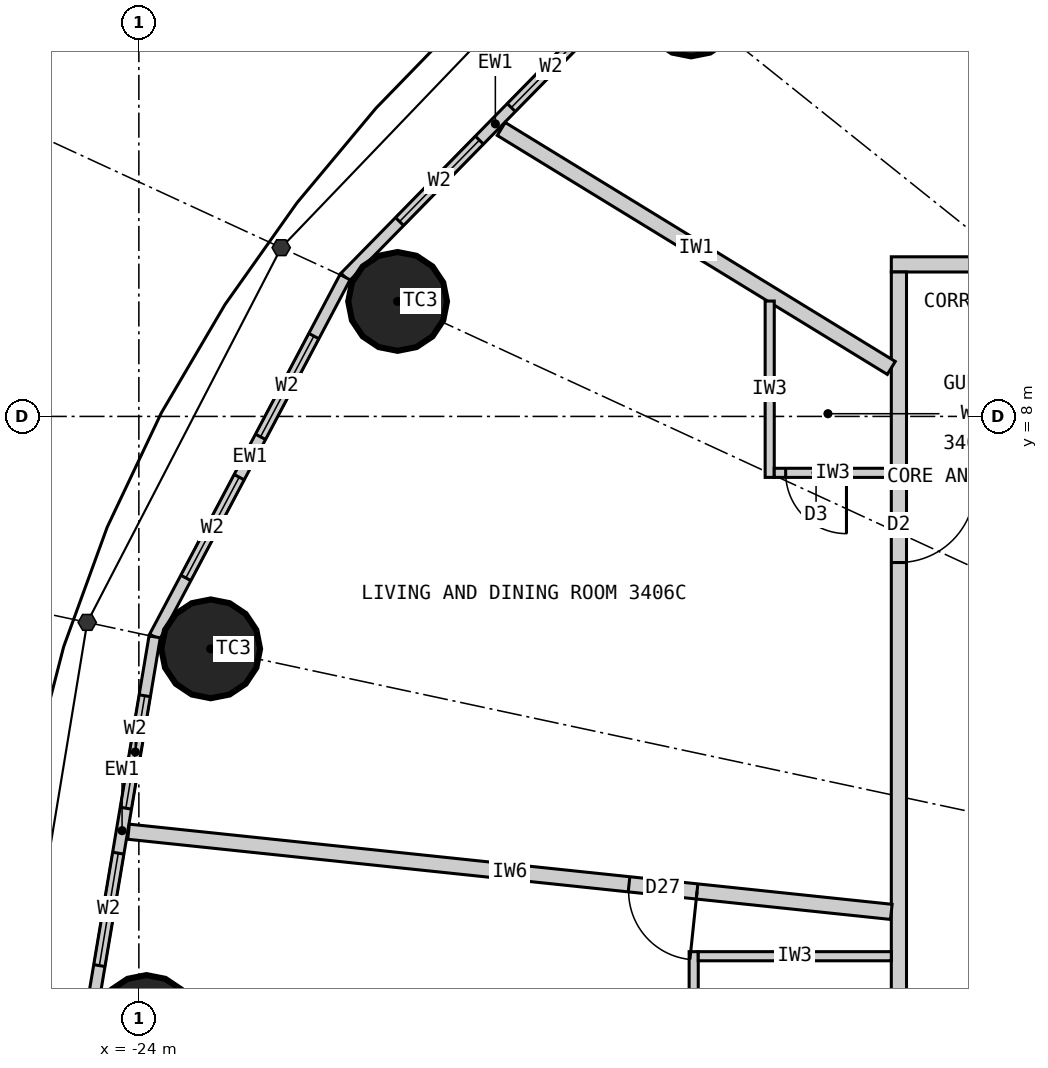
"""IFC4 building model, lengths in metres.
Left out: names, types, materials, properties, quantities, classifications, styles, units other than length and angle.
Written with IfcOpenShell. Run it as: python <this file> out.ifc"""

import sys

from ifc_helpers import new_model, si_unit, direction, frame, frame_2d, origin, origin_2d, place, context, subcontext, project, spatial, rectangle, circle, extrude, element, fill, save


model = new_model("IFC4")
c1 = context("Model", 3, precision=1e-05, world=origin(), true_north=direction((0.0, 1.0)))
c2 = subcontext(c1, "Body", "Model", "MODEL_VIEW")
j1 = project(units=[si_unit("LENGTHUNIT", "METRE"), si_unit("PLANEANGLEUNIT", "RADIAN")], contexts=[c1])
p1 = place(None, origin())
s1 = spatial("IfcSite", under=j1, at=p1, CompositionType="ELEMENT")
p2 = place(p1, origin())
s2 = spatial("IfcBuilding", under=s1, at=p2, CompositionType="ELEMENT")
p3 = place(p2, frame((0.0, 0.0, 132.0)))
s3 = spatial("IfcBuildingStorey", under=s2, at=p3, CompositionType="ELEMENT", Elevation=132.0)
for number, where, z_axis, x_axis in (
    (1, (-16.734, 13.387, 0.0), (0.0, 0.0, 1.0), (1.0, 0.0, 0.0)),
    (2, (-20.596, 9.513, 0.0), (0.0, 0.0, 1.0), (1.0, 0.0, 0.0)),
    (3, (-23.055, 4.942, 0.0), (0.0, 0.0, 1.0), (1.0, 0.0, 0.0)),
    (4, (-23.9, 0.0, 0.0), (0.0, 0.0, 1.0), (1.0, 0.0, 0.0)),
):
    element("IfcColumn", number, at=place(p3, frame(where, z_axis=z_axis, x_axis=x_axis)), inside=s3, PredefinedType="COLUMN", context=c2, shape_type="SweptSolid", body=[
        extrude(circle(Radius=0.65, at=origin_2d()), origin(), (0.0, 0.0, 1.0), 3.3),
    ])
p4 = place(p3, frame((-17.332, 13.866, 0.0), z_axis=(0.0, 0.0, 1.0), x_axis=(-0.700136650834, -0.714008872605, 0.0)))
e5 = element("IfcWall", 5, at=p4, inside=s3, PredefinedType="ELEMENTEDWALL", context=c2, shape_type="SweptSolid", body=[
    extrude(rectangle(XDim=5.649, YDim=0.15, at=frame_2d((2.825, 0.0))), origin(), (0.0, 0.0, 1.0), 3.12),
])
p5 = place(p4, frame((1.025, 0.0, 0.9)))
e6 = element("IfcOpeningElement", 6, at=p5, cuts=e5, PredefinedType="OPENING", context=c2, shape_type="SweptSolid", body=[
    extrude(rectangle(XDim=1.5, YDim=1.9, at=frame_2d((0.75, 0.95))), frame((0.0, 0.085, 0.0), z_axis=(0.0, -1.0, 0.0), x_axis=(1.0, 0.0, 0.0)), (0.0, 0.0, 1.0), 0.17),
])
p6 = place(p4, frame((3.125, 0.0, 0.9)))
e7 = element("IfcOpeningElement", 7, at=p6, cuts=e5, PredefinedType="OPENING", context=c2, shape_type="SweptSolid", body=[
    extrude(rectangle(XDim=1.5, YDim=1.9, at=frame_2d((0.75, 0.95))), frame((0.0, 0.085, 0.0), z_axis=(0.0, -1.0, 0.0), x_axis=(1.0, 0.0, 0.0)), (0.0, 0.0, 1.0), 0.17),
])
p7 = place(p3, frame((-21.287, 9.832, 0.0), z_axis=(0.0, 0.0, 1.0), x_axis=(-0.467814388454, -0.883826735257, 0.0)))
e8 = element("IfcWall", 8, at=p7, inside=s3, PredefinedType="ELEMENTEDWALL", context=c2, shape_type="SweptSolid", body=[
    extrude(rectangle(XDim=5.354, YDim=0.15, at=frame_2d((2.677, 0.0))), origin(), (0.0, 0.0, 1.0), 3.12),
])
p8 = place(p7, frame((0.877, 0.0, 0.9)))
e9 = element("IfcOpeningElement", 9, at=p8, cuts=e8, PredefinedType="OPENING", context=c2, shape_type="SweptSolid", body=[
    extrude(rectangle(XDim=1.5, YDim=1.9, at=frame_2d((0.75, 0.95))), frame((0.0, 0.085, 0.0), z_axis=(0.0, -1.0, 0.0), x_axis=(1.0, 0.0, 0.0)), (0.0, 0.0, 1.0), 0.17),
])
p9 = place(p7, frame((2.977, 0.0, 0.9)))
e10 = element("IfcOpeningElement", 10, at=p9, cuts=e8, PredefinedType="OPENING", context=c2, shape_type="SweptSolid", body=[
    extrude(rectangle(XDim=1.5, YDim=1.9, at=frame_2d((0.75, 0.95))), frame((0.0, 0.085, 0.0), z_axis=(0.0, -1.0, 0.0), x_axis=(1.0, 0.0, 0.0)), (0.0, 0.0, 1.0), 0.17),
])
p10 = place(p3, frame((-23.792, 5.1, 0.0), z_axis=(0.0, 0.0, 1.0), x_axis=(-0.165883894218, -0.986145290329, 0.0)))
e11 = element("IfcWall", 11, at=p10, inside=s3, PredefinedType="ELEMENTEDWALL", context=c2, shape_type="SweptSolid", body=[
    extrude(rectangle(XDim=5.172, YDim=0.15, at=frame_2d((2.586, 0.0))), origin(), (0.0, 0.0, 1.0), 3.12),
])
p11 = place(p10, frame((0.786, 0.0, 0.9)))
e12 = element("IfcOpeningElement", 12, at=p11, cuts=e11, PredefinedType="OPENING", context=c2, shape_type="SweptSolid", body=[
    extrude(rectangle(XDim=1.5, YDim=1.9, at=frame_2d((0.75, 0.95))), frame((0.0, 0.085, 0.0), z_axis=(0.0, -1.0, 0.0), x_axis=(1.0, 0.0, 0.0)), (0.0, 0.0, 1.0), 0.17),
])
p12 = place(p10, frame((2.886, 0.0, 0.9)))
e13 = element("IfcOpeningElement", 13, at=p12, cuts=e11, PredefinedType="OPENING", context=c2, shape_type="SweptSolid", body=[
    extrude(rectangle(XDim=1.5, YDim=1.9, at=frame_2d((0.75, 0.95))), frame((0.0, 0.085, 0.0), z_axis=(0.0, -1.0, 0.0), x_axis=(1.0, 0.0, 0.0)), (0.0, 0.0, 1.0), 0.17),
])
p13 = place(p3, frame((-14.1, 10.0, 0.0), z_axis=(0.0, 0.0, 1.0), x_axis=(1.0, 0.0, 0.0)))
e14 = element("IfcWall", 14, at=p13, inside=s3, PredefinedType="PARTITIONING", context=c2, shape_type="SweptSolid", body=[
    extrude(rectangle(XDim=12.535, YDim=0.2, at=frame_2d((6.268, 0.0))), origin(), (0.0, 0.0, 1.0), 3.12),
])
p14 = place(p13, frame((2.801, 0.0, 0.0)))
e15 = element("IfcOpeningElement", 15, at=p14, cuts=e14, PredefinedType="OPENING", context=c2, shape_type="SweptSolid", body=[
    extrude(rectangle(XDim=1.0, YDim=2.2, at=frame_2d((0.5, 1.1))), frame((0.0, 0.11, 0.0), z_axis=(0.0, -1.0, 0.0), x_axis=(1.0, 0.0, 0.0)), (0.0, 0.0, 1.0), 0.22),
])
p15 = place(p3, frame((-14.0, 9.9, 0.0), z_axis=(0.0, 0.0, 1.0), x_axis=(0.0, -1.0, 0.0)))
e16 = element("IfcWall", 16, at=p15, inside=s3, PredefinedType="PARTITIONING", context=c2, shape_type="SweptSolid", body=[
    extrude(rectangle(XDim=19.8, YDim=0.2, at=frame_2d((9.9, 0.0))), origin(), (0.0, 0.0, 1.0), 3.12),
])
p16 = place(p15, frame((2.822, 0.0, 0.0)))
e17 = element("IfcOpeningElement", 17, at=p16, cuts=e16, PredefinedType="OPENING", context=c2, shape_type="SweptSolid", body=[
    extrude(rectangle(XDim=1.0, YDim=2.2, at=frame_2d((0.5, 1.1))), frame((0.0, 0.11, 0.0), z_axis=(0.0, -1.0, 0.0), x_axis=(1.0, 0.0, 0.0)), (0.0, 0.0, 1.0), 0.22),
])
p17 = place(p15, frame((13.742, 0.0, 0.0)))
e18 = element("IfcOpeningElement", 18, at=p17, cuts=e16, PredefinedType="OPENING", context=c2, shape_type="SweptSolid", body=[
    extrude(rectangle(XDim=1.0, YDim=2.2, at=frame_2d((0.5, 1.1))), frame((0.0, 0.11, 0.0), z_axis=(0.0, -1.0, 0.0), x_axis=(1.0, 0.0, 0.0)), (0.0, 0.0, 1.0), 0.22),
])
p18 = place(p15, frame((18.698, 0.0, 0.0)))
e19 = element("IfcOpeningElement", 19, at=p18, cuts=e16, PredefinedType="OPENING", context=c2, shape_type="SweptSolid", body=[
    extrude(rectangle(XDim=1.0, YDim=2.2, at=frame_2d((0.5, 1.1))), frame((0.0, 0.11, 0.0), z_axis=(0.0, -1.0, 0.0), x_axis=(1.0, 0.0, 0.0)), (0.0, 0.0, 1.0), 0.22),
])
p19 = place(p3, frame((-14.1, 8.638, 0.0), z_axis=(0.0, 0.0, 1.0), x_axis=(-0.852706758009, 0.5223898782, 0.0)))
e20 = element("IfcWall", 20, at=p19, inside=s3, PredefinedType="PARTITIONING", context=c2, shape_type="SweptSolid", body=[
    extrude(rectangle(XDim=6.019, YDim=0.2, at=frame_2d((3.009, 0.0))), origin(), (0.0, 0.0, 1.0), 3.12),
])
p20 = place(p3, frame((-14.1, 1.482, 0.0), z_axis=(0.0, 0.0, 1.0), x_axis=(-0.994523202615, 0.104516024894, 0.0)))
e21 = element("IfcWall", 21, at=p20, inside=s3, PredefinedType="PARTITIONING", context=c2, shape_type="SweptSolid", body=[
    extrude(rectangle(XDim=10.091, YDim=0.2, at=frame_2d((5.045, 0.0))), origin(), (0.0, 0.0, 1.0), 2.37),
])
p21 = place(p20, frame((2.57, 0.0, 0.0)))
e22 = element("IfcOpeningElement", 22, at=p21, cuts=e21, PredefinedType="OPENING", context=c2, shape_type="SweptSolid", body=[
    extrude(rectangle(XDim=0.9, YDim=2.1, at=frame_2d((0.45, 1.05))), frame((0.0, 0.11, 0.0), z_axis=(0.0, -1.0, 0.0), x_axis=(1.0, 0.0, 0.0)), (0.0, 0.0, 1.0), 0.22),
])
p22 = place(p3, frame((-15.7, 9.518, 0.0), z_axis=(0.0, 0.0, 1.0), x_axis=(0.0, -1.0, 0.0)))
e23 = element("IfcWall", 23, at=p22, inside=s3, PredefinedType="PARTITIONING", context=c2, shape_type="SweptSolid", body=[
    extrude(rectangle(XDim=2.32, YDim=0.12, at=frame_2d((1.16, 0.0))), origin(), (0.0, 0.0, 1.0), 3.12),
])
p23 = place(p3, frame((-14.1, 7.258, 0.0), z_axis=(0.0, 0.0, 1.0), x_axis=(-1.0, 0.0, 0.0)))
e24 = element("IfcWall", 24, at=p23, inside=s3, PredefinedType="PARTITIONING", context=c2, shape_type="SweptSolid", body=[
    extrude(rectangle(XDim=1.54, YDim=0.12, at=frame_2d((0.77, 0.0))), origin(), (0.0, 0.0, 1.0), 3.12),
])
p24 = place(p23, frame((0.59, 0.0, 0.0)))
e25 = element("IfcOpeningElement", 25, at=p24, cuts=e24, PredefinedType="OPENING", context=c2, shape_type="SweptSolid", body=[
    extrude(rectangle(XDim=0.8, YDim=2.1, at=frame_2d((0.4, 1.05))), frame((0.0, 0.07, 0.0), z_axis=(0.0, -1.0, 0.0), x_axis=(1.0, 0.0, 0.0)), (0.0, 0.0, 1.0), 0.14),
])
p25 = place(p3, frame((-16.7, -1.655, 0.0), z_axis=(0.0, 0.0, 1.0), x_axis=(0.0, 1.0, 0.0)))
e26 = element("IfcWall", 26, at=p25, inside=s3, PredefinedType="PARTITIONING", context=c2, shape_type="SweptSolid", body=[
    extrude(rectangle(XDim=2.613, YDim=0.12, at=frame_2d((1.307, 0.0))), origin(), (0.0, 0.0, 1.0), 3.12),
])
p26 = place(p25, frame((0.906, 0.0, 0.0)))
e27 = element("IfcOpeningElement", 27, at=p26, cuts=e26, PredefinedType="OPENING", context=c2, shape_type="SweptSolid", body=[
    extrude(rectangle(XDim=0.8, YDim=2.1, at=frame_2d((0.4, 1.05))), frame((0.0, 0.07, 0.0), z_axis=(0.0, -1.0, 0.0), x_axis=(1.0, 0.0, 0.0)), (0.0, 0.0, 1.0), 0.14),
])
p27 = place(p3, frame((-14.1, 0.898, 0.0), z_axis=(0.0, 0.0, 1.0), x_axis=(-1.0, 0.0, 0.0)))
e28 = element("IfcWall", 28, at=p27, inside=s3, PredefinedType="PARTITIONING", context=c2, shape_type="SweptSolid", body=[
    extrude(rectangle(XDim=2.54, YDim=0.12, at=frame_2d((1.27, 0.0))), origin(), (0.0, 0.0, 1.0), 3.12),
])
p28 = place(p5, origin())
e29 = element("IfcWindow", 29, at=p28, inside=s3, PartitioningType="SINGLE_PANEL", PredefinedType="WINDOW", context=c2, shape_type="SweptSolid", body=[
    extrude(rectangle(XDim=1.5, YDim=1.9, at=frame_2d((0.75, 0.95))), frame((0.0, 0.03, 0.0), z_axis=(0.0, -1.0, 0.0), x_axis=(1.0, 0.0, 0.0)), (0.0, 0.0, 1.0), 0.06),
])
fill(e6, e29)
p29 = place(p6, origin())
e30 = element("IfcWindow", 30, at=p29, inside=s3, PartitioningType="SINGLE_PANEL", PredefinedType="WINDOW", context=c2, shape_type="SweptSolid", body=[
    extrude(rectangle(XDim=1.5, YDim=1.9, at=frame_2d((0.75, 0.95))), frame((0.0, 0.03, 0.0), z_axis=(0.0, -1.0, 0.0), x_axis=(1.0, 0.0, 0.0)), (0.0, 0.0, 1.0), 0.06),
])
fill(e7, e30)
p30 = place(p8, origin())
e31 = element("IfcWindow", 31, at=p30, inside=s3, PartitioningType="SINGLE_PANEL", PredefinedType="WINDOW", context=c2, shape_type="SweptSolid", body=[
    extrude(rectangle(XDim=1.5, YDim=1.9, at=frame_2d((0.75, 0.95))), frame((0.0, 0.03, 0.0), z_axis=(0.0, -1.0, 0.0), x_axis=(1.0, 0.0, 0.0)), (0.0, 0.0, 1.0), 0.06),
])
fill(e9, e31)
p31 = place(p9, origin())
e32 = element("IfcWindow", 32, at=p31, inside=s3, PartitioningType="SINGLE_PANEL", PredefinedType="WINDOW", context=c2, shape_type="SweptSolid", body=[
    extrude(rectangle(XDim=1.5, YDim=1.9, at=frame_2d((0.75, 0.95))), frame((0.0, 0.03, 0.0), z_axis=(0.0, -1.0, 0.0), x_axis=(1.0, 0.0, 0.0)), (0.0, 0.0, 1.0), 0.06),
])
fill(e10, e32)
p32 = place(p11, origin())
e33 = element("IfcWindow", 33, at=p32, inside=s3, PartitioningType="SINGLE_PANEL", PredefinedType="WINDOW", context=c2, shape_type="SweptSolid", body=[
    extrude(rectangle(XDim=1.5, YDim=1.9, at=frame_2d((0.75, 0.95))), frame((0.0, 0.03, 0.0), z_axis=(0.0, -1.0, 0.0), x_axis=(1.0, 0.0, 0.0)), (0.0, 0.0, 1.0), 0.06),
])
fill(e12, e33)
p33 = place(p12, origin())
e34 = element("IfcWindow", 34, at=p33, inside=s3, PartitioningType="SINGLE_PANEL", PredefinedType="WINDOW", context=c2, shape_type="SweptSolid", body=[
    extrude(rectangle(XDim=1.5, YDim=1.9, at=frame_2d((0.75, 0.95))), frame((0.0, 0.03, 0.0), z_axis=(0.0, -1.0, 0.0), x_axis=(1.0, 0.0, 0.0)), (0.0, 0.0, 1.0), 0.06),
])
fill(e13, e34)
p34 = place(p24, origin())
e35 = element("IfcDoor", 35, at=p34, inside=s3, OperationType="SINGLE_SWING_LEFT", PredefinedType="DOOR", context=c2, shape_type="SweptSolid", body=[
    extrude(rectangle(XDim=0.8, YDim=2.1, at=frame_2d((0.4, 1.05))), frame((0.0, 0.025, 0.0), z_axis=(0.0, -1.0, 0.0), x_axis=(1.0, 0.0, 0.0)), (0.0, 0.0, 1.0), 0.05),
])
fill(e25, e35)
p35 = place(p16, origin())
e36 = element("IfcDoor", 36, at=p35, inside=s3, OperationType="SINGLE_SWING_LEFT", PredefinedType="DOOR", context=c2, shape_type="SweptSolid", body=[
    extrude(rectangle(XDim=1.0, YDim=2.2, at=frame_2d((0.5, 1.1))), frame((0.0, 0.025, 0.0), z_axis=(0.0, -1.0, 0.0), x_axis=(1.0, 0.0, 0.0)), (0.0, 0.0, 1.0), 0.05),
])
fill(e17, e36)
p36 = place(p21, origin())
e37 = element("IfcDoor", 37, at=p36, inside=s3, OperationType="SINGLE_SWING_LEFT", PredefinedType="DOOR", context=c2, shape_type="SweptSolid", body=[
    extrude(rectangle(XDim=0.9, YDim=2.1, at=frame_2d((0.45, 1.05))), frame((0.0, 0.025, 0.0), z_axis=(0.0, -1.0, 0.0), x_axis=(1.0, 0.0, 0.0)), (0.0, 0.0, 1.0), 0.05),
])
fill(e22, e37)
save(model, sys.argv[1])
